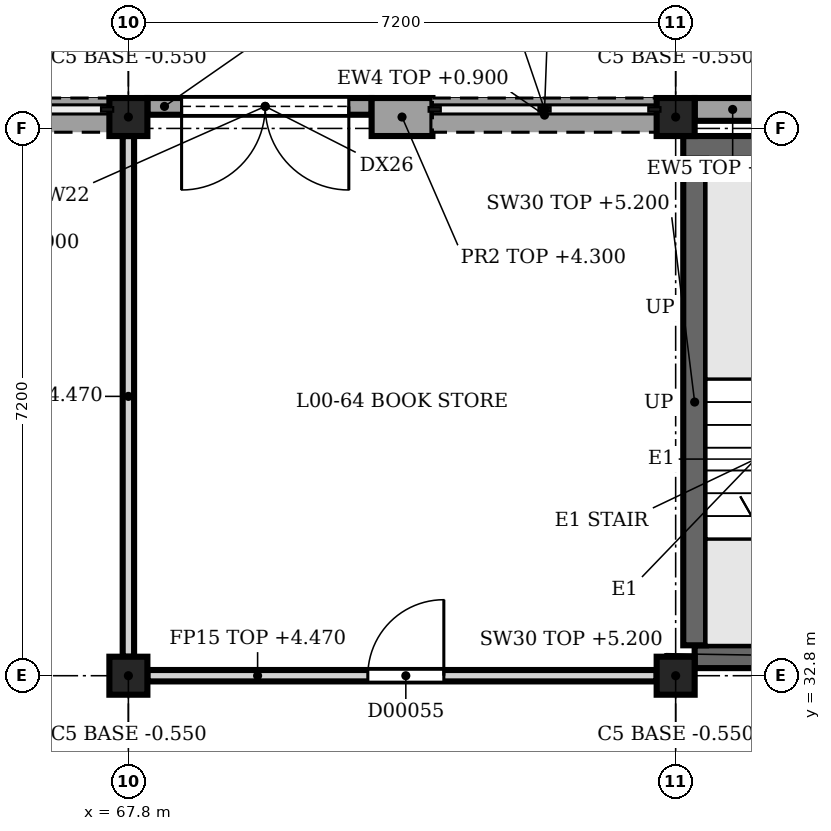
"""IFC4 building model, lengths in metres.
Left out: names, types, materials, properties, quantities, classifications, styles, units other than length and angle.
Written with IfcOpenShell. Run it as: python <this file> out.ifc"""

import sys

from ifc_helpers import new_model, si_unit, direction, frame, frame_2d, origin, origin_2d, place, context, subcontext, project, spatial, rectangle, extrude, element, fill, save


model = new_model("IFC4")
c1 = context("Model", 3, precision=1e-05, world=origin(), true_north=direction((0.0, 1.0)))
c2 = subcontext(c1, "Body", "Model", "MODEL_VIEW")
j1 = project(units=[si_unit("LENGTHUNIT", "METRE"), si_unit("PLANEANGLEUNIT", "RADIAN")], contexts=[c1])
p1 = place(None, origin())
s1 = spatial("IfcSite", under=j1, at=p1, CompositionType="ELEMENT")
p2 = place(p1, origin())
s2 = spatial("IfcBuilding", under=s1, at=p2, CompositionType="ELEMENT")
p3 = place(p2, origin())
s3 = spatial("IfcBuildingStorey", under=s2, at=p3, CompositionType="ELEMENT", Elevation=0.0)
for number, where, z_axis, x_axis in (
    (1, (67.8, 32.8, -0.55), (0.0, 0.0, 1.0), (1.0, 0.0, 0.0)),
    (2, (67.8, 40.15, -0.55), (0.0, 0.0, 1.0), (1.0, 0.0, 0.0)),
    (3, (75.0, 32.8, -0.55), (0.0, 0.0, 1.0), (1.0, 0.0, 0.0)),
    (4, (75.0, 40.15, -0.55), (0.0, 0.0, 1.0), (1.0, 0.0, 0.0)),
):
    element("IfcColumn", number, at=place(p3, frame(where, z_axis=z_axis, x_axis=x_axis)), inside=s3, PredefinedType="COLUMN", context=c2, shape_type="SweptSolid", body=[
        extrude(rectangle(XDim=0.5, YDim=0.5, at=origin_2d()), origin(), (0.0, 0.0, 1.0), 5.95),
    ])
p4 = place(p3, frame((71.0, 40.15, 0.0), z_axis=(0.0, 0.0, 1.0), x_axis=(1.0, 0.0, 0.0)))
e5 = element("IfcWall", 5, at=p4, inside=s3, PredefinedType="SOLIDWALL", context=c2, shape_type="SweptSolid", body=[
    extrude(rectangle(XDim=0.8, YDim=0.5, at=frame_2d((0.4, 0.0))), origin(), (0.0, 0.0, 1.0), 4.3),
])
p5 = place(p3, frame((64.5, 40.175, 0.0), z_axis=(0.0, 0.0, 1.0), x_axis=(1.0, 0.0, 0.0)))
e6 = element("IfcWall", 6, at=p5, inside=s3, PredefinedType="SOLIDWALL", context=c2, shape_type="SweptSolid", body=[
    extrude(rectangle(XDim=3.05, YDim=0.45, at=frame_2d((1.525, 0.0))), origin(), (0.0, 0.0, 1.0), 0.9),
])
p6 = place(p3, frame((68.05, 40.29, 0.0), z_axis=(0.0, 0.0, 1.0), x_axis=(1.0, 0.0, 0.0)))
e7 = element("IfcWall", 7, at=p6, inside=s3, PredefinedType="SOLIDWALL", context=c2, shape_type="SweptSolid", body=[
    extrude(rectangle(XDim=2.95, YDim=0.22, at=frame_2d((1.475, 0.0))), origin(), (0.0, 0.0, 1.0), 4.3),
])
p7 = place(p6, frame((0.45, 0.0, 0.0)))
e8 = element("IfcOpeningElement", 8, at=p7, cuts=e7, PredefinedType="OPENING", context=c2, shape_type="SweptSolid", body=[
    extrude(rectangle(XDim=2.2, YDim=2.4, at=frame_2d((1.1, 1.2))), frame((0.0, 0.12, 0.0), z_axis=(0.0, -1.0, 0.0), x_axis=(1.0, 0.0, 0.0)), (0.0, 0.0, 1.0), 0.24),
])
p8 = place(p6, frame((0.45, 0.0, 2.5)))
e9 = element("IfcOpeningElement", 9, at=p8, cuts=e7, PredefinedType="OPENING", context=c2, shape_type="SweptSolid", body=[
    extrude(rectangle(XDim=2.2, YDim=0.45, at=frame_2d((1.1, 0.225))), frame((0.0, 0.12, 0.0), z_axis=(0.0, -1.0, 0.0), x_axis=(1.0, 0.0, 0.0)), (0.0, 0.0, 1.0), 0.24),
])
p9 = place(p3, frame((71.8, 40.175, 0.0), z_axis=(0.0, 0.0, 1.0), x_axis=(1.0, 0.0, 0.0)))
e10 = element("IfcWall", 10, at=p9, inside=s3, PredefinedType="SOLIDWALL", context=c2, shape_type="SweptSolid", body=[
    extrude(rectangle(XDim=2.95, YDim=0.45, at=frame_2d((1.475, 0.0))), origin(), (0.0, 0.0, 1.0), 0.9),
])
p10 = place(p3, frame((75.25, 40.25, 0.0), z_axis=(0.0, 0.0, 1.0), x_axis=(1.0, 0.0, 0.0)))
e11 = element("IfcWall", 11, at=p10, inside=s3, PredefinedType="SOLIDWALL", context=c2, shape_type="SweptSolid", body=[
    extrude(rectangle(XDim=2.95, YDim=0.3, at=frame_2d((1.475, 0.0))), origin(), (0.0, 0.0, 1.0), 4.3),
])
p11 = place(p10, frame((1.0, 0.0, 0.0)))
e12 = element("IfcOpeningElement", 12, at=p11, cuts=e11, PredefinedType="OPENING", context=c2, shape_type="SweptSolid", body=[
    extrude(rectangle(XDim=1.1, YDim=2.2, at=frame_2d((0.55, 1.1))), frame((0.0, 0.16, 0.0), z_axis=(0.0, -1.0, 0.0), x_axis=(1.0, 0.0, 0.0)), (0.0, 0.0, 1.0), 0.32),
])
p12 = place(p10, frame((1.0, 0.0, 2.3)))
e13 = element("IfcOpeningElement", 13, at=p12, cuts=e11, PredefinedType="OPENING", context=c2, shape_type="SweptSolid", body=[
    extrude(rectangle(XDim=1.1, YDim=0.45, at=frame_2d((0.55, 0.225))), frame((0.0, 0.16, 0.0), z_axis=(0.0, -1.0, 0.0), x_axis=(1.0, 0.0, 0.0)), (0.0, 0.0, 1.0), 0.32),
])
p13 = place(p3, frame((75.25, 33.05, 0.0), z_axis=(0.0, 0.0, 1.0), x_axis=(1.0, 0.0, 0.0)))
e14 = element("IfcWall", 14, at=p13, inside=s3, PredefinedType="SHEAR", context=c2, shape_type="SweptSolid", body=[
    extrude(rectangle(XDim=6.55, YDim=0.3, at=frame_2d((3.275, 0.0))), origin(), (0.0, 0.0, 1.0), 5.2),
])
p14 = place(p13, frame((4.35, 0.0, 0.0)))
e15 = element("IfcOpeningElement", 15, at=p14, cuts=e14, PredefinedType="OPENING", context=c2, shape_type="SweptSolid", body=[
    extrude(rectangle(XDim=1.2, YDim=2.1, at=frame_2d((0.6, 1.05))), frame((0.0, 0.16, 0.0), z_axis=(0.0, -1.0, 0.0), x_axis=(1.0, 0.0, 0.0)), (0.0, 0.0, 1.0), 0.32),
])
p15 = place(p3, frame((75.1, 39.75, 0.0), z_axis=(0.0, 0.0, 1.0), x_axis=(1.0, 0.0, 0.0)))
e16 = element("IfcWall", 16, at=p15, inside=s3, PredefinedType="SHEAR", context=c2, shape_type="SweptSolid", body=[
    extrude(rectangle(XDim=7.0, YDim=0.3, at=frame_2d((3.5, 0.0))), origin(), (0.0, 0.0, 1.0), 5.2),
])
p16 = place(p15, frame((1.15, 0.0, 0.0)))
e17 = element("IfcOpeningElement", 17, at=p16, cuts=e16, PredefinedType="OPENING", context=c2, shape_type="SweptSolid", body=[
    extrude(rectangle(XDim=1.1, YDim=2.1, at=frame_2d((0.55, 1.05))), frame((0.0, 0.16, 0.0), z_axis=(0.0, -1.0, 0.0), x_axis=(1.0, 0.0, 0.0)), (0.0, 0.0, 1.0), 0.32),
])
p17 = place(p3, frame((75.25, 33.2, 0.0), z_axis=(0.0, 0.0, 1.0), x_axis=(0.0, 1.0, 0.0)))
e18 = element("IfcWall", 18, at=p17, inside=s3, PredefinedType="SHEAR", context=c2, shape_type="SweptSolid", body=[
    extrude(rectangle(XDim=6.4, YDim=0.3, at=frame_2d((3.2, 0.0))), origin(), (0.0, 0.0, 1.0), 5.2),
])
p18 = place(p3, frame((68.05, 32.8, 0.0), z_axis=(0.0, 0.0, 1.0), x_axis=(1.0, 0.0, 0.0)))
e19 = element("IfcWall", 19, at=p18, inside=s3, PredefinedType="PARTITIONING", context=c2, shape_type="SweptSolid", body=[
    extrude(rectangle(XDim=6.7, YDim=0.15, at=frame_2d((3.35, 0.0))), origin(), (0.0, 0.0, 1.0), 4.47),
])
p19 = place(p18, frame((2.9, 0.0, 0.0)))
e20 = element("IfcOpeningElement", 20, at=p19, cuts=e19, PredefinedType="OPENING", context=c2, shape_type="SweptSolid", body=[
    extrude(rectangle(XDim=1.0, YDim=2.1, at=frame_2d((0.5, 1.05))), frame((0.0, 0.085, 0.0), z_axis=(0.0, -1.0, 0.0), x_axis=(1.0, 0.0, 0.0)), (0.0, 0.0, 1.0), 0.17),
])
p20 = place(p3, frame((67.8, 33.05, 0.0), z_axis=(0.0, 0.0, 1.0), x_axis=(0.0, 1.0, 0.0)))
e21 = element("IfcWall", 21, at=p20, inside=s3, PredefinedType="PARTITIONING", context=c2, shape_type="SweptSolid", body=[
    extrude(rectangle(XDim=6.85, YDim=0.15, at=frame_2d((3.425, 0.0))), origin(), (0.0, 0.0, 1.0), 4.47),
])
p21 = place(p7, origin())
e22 = element("IfcDoor", 22, at=p21, inside=s3, OperationType="SINGLE_SWING_LEFT", PredefinedType="DOOR", context=c2, shape_type="SweptSolid", body=[
    extrude(rectangle(XDim=2.2, YDim=2.4, at=frame_2d((1.1, 1.2))), frame((0.0, 0.025, 0.0), z_axis=(0.0, -1.0, 0.0), x_axis=(1.0, 0.0, 0.0)), (0.0, 0.0, 1.0), 0.05),
])
fill(e8, e22)
p22 = place(p8, origin())
e23 = element("IfcWindow", 23, at=p22, inside=s3, PartitioningType="SINGLE_PANEL", PredefinedType="WINDOW", context=c2, shape_type="SweptSolid", body=[
    extrude(rectangle(XDim=2.2, YDim=0.45, at=frame_2d((1.1, 0.225))), frame((0.0, 0.03, 0.0), z_axis=(0.0, -1.0, 0.0), x_axis=(1.0, 0.0, 0.0)), (0.0, 0.0, 1.0), 0.06),
])
fill(e9, e23)
p23 = place(p19, origin())
e24 = element("IfcDoor", 24, at=p23, inside=s3, OperationType="SINGLE_SWING_RIGHT", PredefinedType="DOOR", context=c2, shape_type="SweptSolid", body=[
    extrude(rectangle(XDim=1.0, YDim=2.1, at=frame_2d((0.5, 1.05))), frame((0.0, 0.025, 0.0), z_axis=(0.0, -1.0, 0.0), x_axis=(1.0, 0.0, 0.0)), (0.0, 0.0, 1.0), 0.05),
])
fill(e20, e24)
save(model, sys.argv[1])
